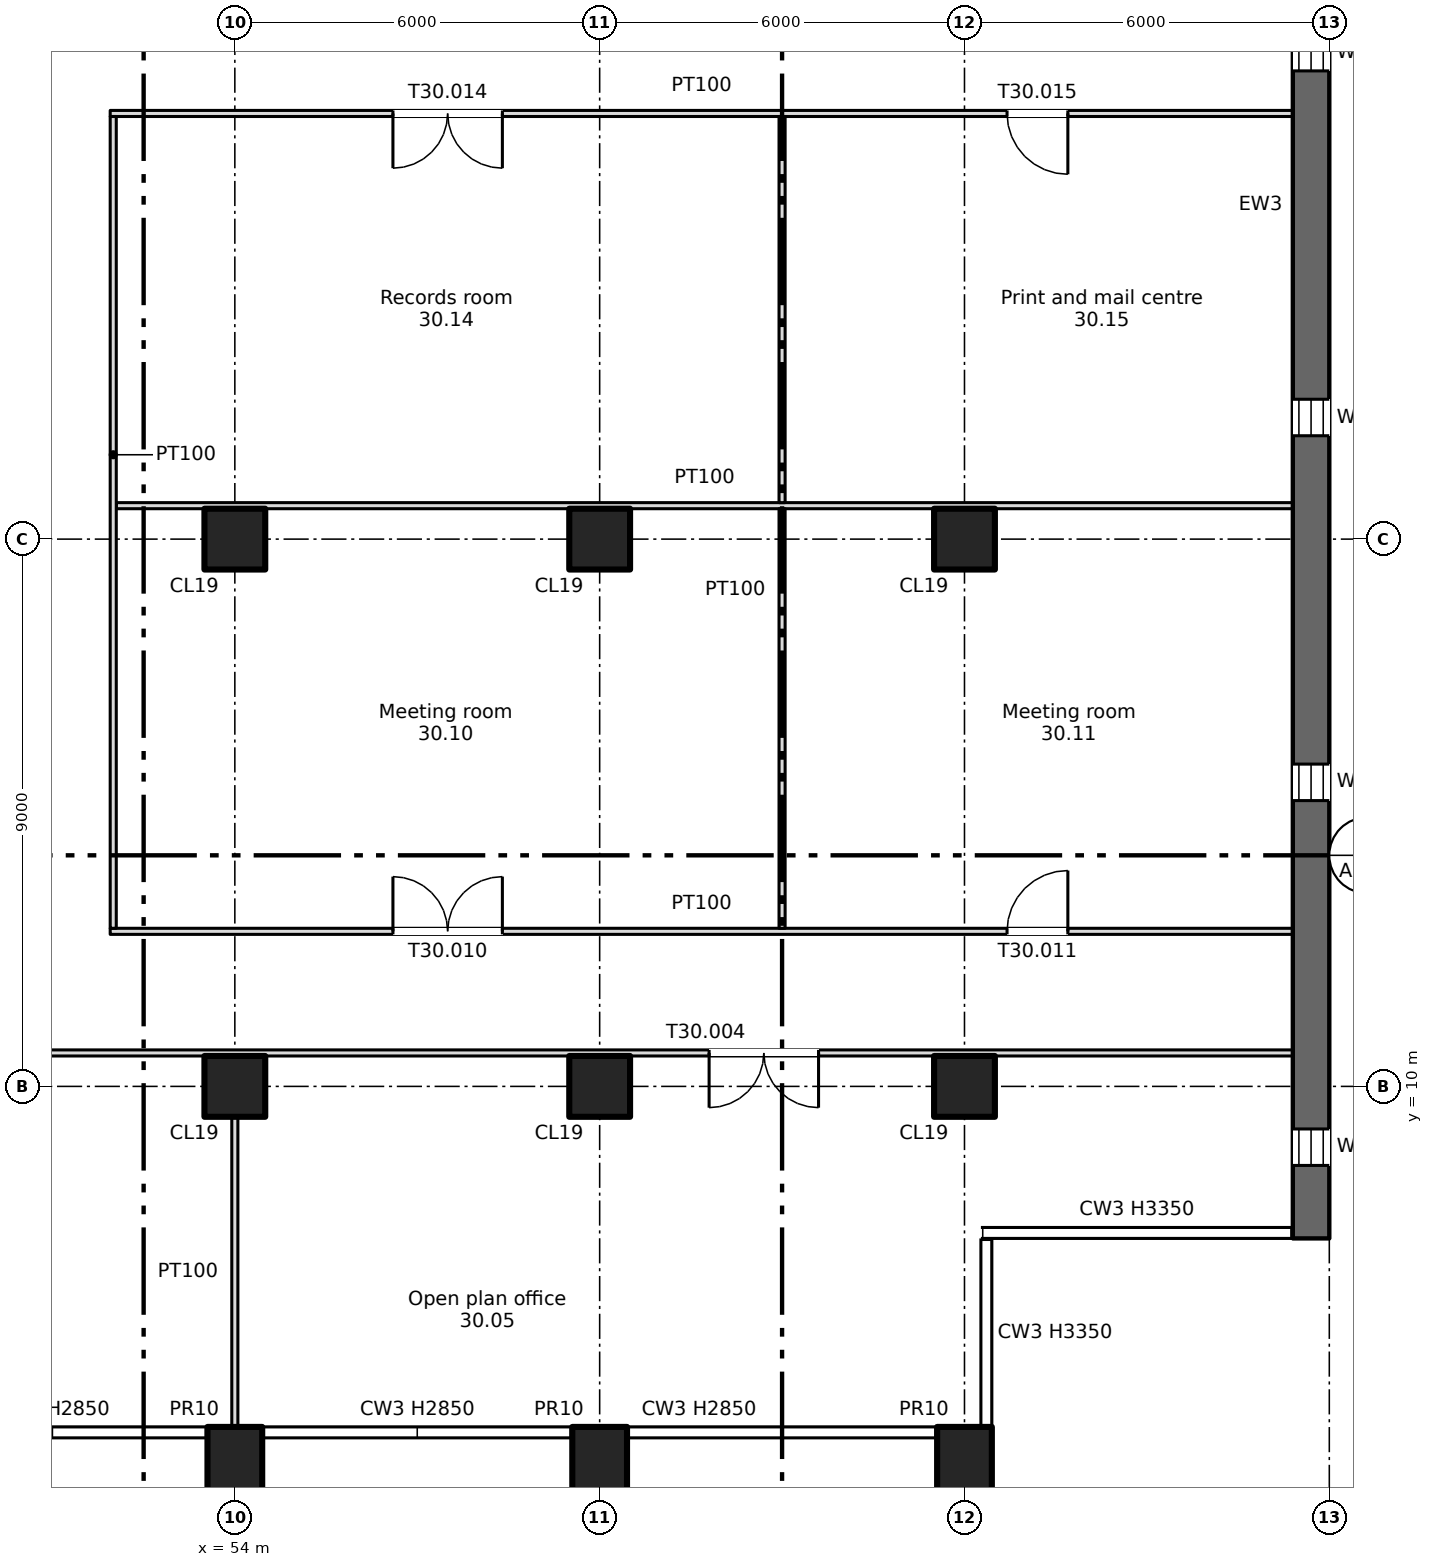
"""IFC4 building model, lengths in metres.
Left out: names, types, materials, properties, quantities, classifications, styles, units other than length and angle.
Written with IfcOpenShell. Run it as: python <this file> out.ifc"""

import sys

from ifc_helpers import new_model, si_unit, direction, frame, frame_2d, origin, origin_2d, place, context, subcontext, project, spatial, rectangle, extrude, element, fill, save


model = new_model("IFC4")
c1 = context("Model", 3, precision=1e-05, world=origin(), true_north=direction((0.0, 1.0)))
c2 = subcontext(c1, "Body", "Model", "MODEL_VIEW")
j1 = project(units=[si_unit("LENGTHUNIT", "METRE"), si_unit("PLANEANGLEUNIT", "RADIAN")], contexts=[c1])
p1 = place(None, origin())
s1 = spatial("IfcSite", under=j1, at=p1, CompositionType="ELEMENT")
p2 = place(p1, origin())
s2 = spatial("IfcBuilding", under=s1, at=p2, CompositionType="ELEMENT")
p3 = place(p2, frame((0.0, 0.0, 211.75)))
s3 = spatial("IfcBuildingStorey", under=s2, at=p3, CompositionType="ELEMENT", Elevation=211.75)
for number, where, z_axis, x_axis in (
    (1, (54.0, 3.7, -0.4), (0.0, 0.0, 1.0), (1.0, 0.0, 0.0)),
    (2, (60.0, 3.7, -0.4), (0.0, 0.0, 1.0), (1.0, 0.0, 0.0)),
    (3, (66.0, 3.7, -0.4), (0.0, 0.0, 1.0), (1.0, 0.0, 0.0)),
):
    element("IfcColumn", number, at=place(p3, frame(where, z_axis=z_axis, x_axis=x_axis)), inside=s3, PredefinedType="COLUMN", context=c2, shape_type="SweptSolid", body=[
        extrude(rectangle(XDim=0.9, YDim=1.4, at=origin_2d()), origin(), (0.0, 0.0, 1.0), 3.75),
    ])
for number, where, z_axis, x_axis in (
    (4, (54.0, 10.0, 0.0), (0.0, 0.0, 1.0), (1.0, 0.0, 0.0)),
    (5, (54.0, 19.0, 0.0), (0.0, 0.0, 1.0), (1.0, 0.0, 0.0)),
    (6, (60.0, 10.0, 0.0), (0.0, 0.0, 1.0), (1.0, 0.0, 0.0)),
    (7, (60.0, 19.0, 0.0), (0.0, 0.0, 1.0), (1.0, 0.0, 0.0)),
    (8, (66.0, 10.0, 0.0), (0.0, 0.0, 1.0), (1.0, 0.0, 0.0)),
    (9, (66.0, 19.0, 0.0), (0.0, 0.0, 1.0), (1.0, 0.0, 0.0)),
):
    element("IfcColumn", number, at=place(p3, frame(where, z_axis=z_axis, x_axis=x_axis)), inside=s3, PredefinedType="COLUMN", context=c2, shape_type="SweptSolid", body=[
        extrude(rectangle(XDim=1.0, YDim=1.0, at=origin_2d()), origin(), (0.0, 0.0, 1.0), 3.35),
    ])
p4 = place(p3, frame((71.7, 7.5, 0.0), z_axis=(0.0, 0.0, 1.0), x_axis=(0.0, 1.0, 0.0)))
e10 = element("IfcWall", 10, at=p4, inside=s3, PredefinedType="SHEAR", context=c2, shape_type="SweptSolid", body=[
    extrude(rectangle(XDim=34.0, YDim=0.6, at=frame_2d((17.0, 0.0))), origin(), (0.0, 0.0, 1.0), 3.35),
])
p5 = place(p4, frame((1.2, 0.0, 0.6)))
e11 = element("IfcOpeningElement", 11, at=p5, cuts=e10, PredefinedType="OPENING", context=c2, shape_type="SweptSolid", body=[
    extrude(rectangle(XDim=0.6, YDim=2.4, at=frame_2d((0.3, 1.2))), frame((0.0, 0.31, 0.0), z_axis=(0.0, -1.0, 0.0), x_axis=(1.0, 0.0, 0.0)), (0.0, 0.0, 1.0), 0.62),
])
p6 = place(p4, frame((7.2, 0.0, 0.6)))
e12 = element("IfcOpeningElement", 12, at=p6, cuts=e10, PredefinedType="OPENING", context=c2, shape_type="SweptSolid", body=[
    extrude(rectangle(XDim=0.6, YDim=2.4, at=frame_2d((0.3, 1.2))), frame((0.0, 0.31, 0.0), z_axis=(0.0, -1.0, 0.0), x_axis=(1.0, 0.0, 0.0)), (0.0, 0.0, 1.0), 0.62),
])
p7 = place(p4, frame((13.2, 0.0, 0.6)))
e13 = element("IfcOpeningElement", 13, at=p7, cuts=e10, PredefinedType="OPENING", context=c2, shape_type="SweptSolid", body=[
    extrude(rectangle(XDim=0.6, YDim=2.4, at=frame_2d((0.3, 1.2))), frame((0.0, 0.31, 0.0), z_axis=(0.0, -1.0, 0.0), x_axis=(1.0, 0.0, 0.0)), (0.0, 0.0, 1.0), 0.62),
])
p8 = place(p4, frame((19.2, 0.0, 0.6)))
e14 = element("IfcOpeningElement", 14, at=p8, cuts=e10, PredefinedType="OPENING", context=c2, shape_type="SweptSolid", body=[
    extrude(rectangle(XDim=0.6, YDim=2.4, at=frame_2d((0.3, 1.2))), frame((0.0, 0.31, 0.0), z_axis=(0.0, -1.0, 0.0), x_axis=(1.0, 0.0, 0.0)), (0.0, 0.0, 1.0), 0.62),
])
p9 = place(p4, frame((25.2, 0.0, 0.6)))
e15 = element("IfcOpeningElement", 15, at=p9, cuts=e10, PredefinedType="OPENING", context=c2, shape_type="SweptSolid", body=[
    extrude(rectangle(XDim=0.6, YDim=2.4, at=frame_2d((0.3, 1.2))), frame((0.0, 0.31, 0.0), z_axis=(0.0, -1.0, 0.0), x_axis=(1.0, 0.0, 0.0)), (0.0, 0.0, 1.0), 0.62),
])
p10 = place(p4, frame((31.2, 0.0, 0.6)))
e16 = element("IfcOpeningElement", 16, at=p10, cuts=e10, PredefinedType="OPENING", context=c2, shape_type="SweptSolid", body=[
    extrude(rectangle(XDim=0.6, YDim=2.4, at=frame_2d((0.3, 1.2))), frame((0.0, 0.31, 0.0), z_axis=(0.0, -1.0, 0.0), x_axis=(1.0, 0.0, 0.0)), (0.0, 0.0, 1.0), 0.62),
])
p11 = place(p3, frame((6.6, 10.55, 0.0), z_axis=(0.0, 0.0, 1.0), x_axis=(1.0, 0.0, 0.0)))
e17 = element("IfcWall", 17, at=p11, inside=s3, PredefinedType="PARTITIONING", context=c2, shape_type="SweptSolid", body=[
    extrude(rectangle(XDim=64.8, YDim=0.1, at=frame_2d((32.4, 0.0))), origin(), (0.0, 0.0, 1.0), 3.35),
])
p12 = place(p11, frame((30.0, 0.0, 0.0)))
e18 = element("IfcOpeningElement", 18, at=p12, cuts=e17, PredefinedType="OPENING", context=c2, shape_type="SweptSolid", body=[
    extrude(rectangle(XDim=1.8, YDim=2.1, at=frame_2d((0.9, 1.05))), frame((0.0, 0.06, 0.0), z_axis=(0.0, -1.0, 0.0), x_axis=(1.0, 0.0, 0.0)), (0.0, 0.0, 1.0), 0.12),
])
p13 = place(p11, frame((42.0, 0.0, 0.0)))
e19 = element("IfcOpeningElement", 19, at=p13, cuts=e17, PredefinedType="OPENING", context=c2, shape_type="SweptSolid", body=[
    extrude(rectangle(XDim=1.8, YDim=2.1, at=frame_2d((0.9, 1.05))), frame((0.0, 0.06, 0.0), z_axis=(0.0, -1.0, 0.0), x_axis=(1.0, 0.0, 0.0)), (0.0, 0.0, 1.0), 0.12),
])
p14 = place(p11, frame((12.05, 0.0, 0.0)))
e20 = element("IfcOpeningElement", 20, at=p14, cuts=e17, PredefinedType="OPENING", context=c2, shape_type="SweptSolid", body=[
    extrude(rectangle(XDim=1.8, YDim=2.1, at=frame_2d((0.9, 1.05))), frame((0.0, 0.06, 0.0), z_axis=(0.0, -1.0, 0.0), x_axis=(1.0, 0.0, 0.0)), (0.0, 0.0, 1.0), 0.12),
])
p15 = place(p11, frame((55.2, 0.0, 0.0)))
e21 = element("IfcOpeningElement", 21, at=p15, cuts=e17, PredefinedType="OPENING", context=c2, shape_type="SweptSolid", body=[
    extrude(rectangle(XDim=1.8, YDim=2.1, at=frame_2d((0.9, 1.05))), frame((0.0, 0.06, 0.0), z_axis=(0.0, -1.0, 0.0), x_axis=(1.0, 0.0, 0.0)), (0.0, 0.0, 1.0), 0.12),
])
p16 = place(p3, frame((51.95, 12.55, 0.0), z_axis=(0.0, 0.0, 1.0), x_axis=(1.0, 0.0, 0.0)))
e22 = element("IfcWall", 22, at=p16, inside=s3, PredefinedType="PARTITIONING", context=c2, shape_type="SweptSolid", body=[
    extrude(rectangle(XDim=19.45, YDim=0.1, at=frame_2d((9.725, 0.0))), origin(), (0.0, 0.0, 1.0), 3.35),
])
p17 = place(p16, frame((4.65, 0.0, 0.0)))
e23 = element("IfcOpeningElement", 23, at=p17, cuts=e22, PredefinedType="OPENING", context=c2, shape_type="SweptSolid", body=[
    extrude(rectangle(XDim=1.8, YDim=2.1, at=frame_2d((0.9, 1.05))), frame((0.0, 0.06, 0.0), z_axis=(0.0, -1.0, 0.0), x_axis=(1.0, 0.0, 0.0)), (0.0, 0.0, 1.0), 0.12),
])
p18 = place(p16, frame((14.75, 0.0, 0.0)))
e24 = element("IfcOpeningElement", 24, at=p18, cuts=e22, PredefinedType="OPENING", context=c2, shape_type="SweptSolid", body=[
    extrude(rectangle(XDim=1.0, YDim=2.1, at=frame_2d((0.5, 1.05))), frame((0.0, 0.06, 0.0), z_axis=(0.0, -1.0, 0.0), x_axis=(1.0, 0.0, 0.0)), (0.0, 0.0, 1.0), 0.12),
])
p19 = place(p3, frame((52.05, 19.55, 0.0), z_axis=(0.0, 0.0, 1.0), x_axis=(1.0, 0.0, 0.0)))
e25 = element("IfcWall", 25, at=p19, inside=s3, PredefinedType="PARTITIONING", context=c2, shape_type="SweptSolid", body=[
    extrude(rectangle(XDim=19.35, YDim=0.1, at=frame_2d((9.675, 0.0))), origin(), (0.0, 0.0, 1.0), 3.35),
])
p20 = place(p3, frame((51.95, 26.0, 0.0), z_axis=(0.0, 0.0, 1.0), x_axis=(1.0, 0.0, 0.0)))
e26 = element("IfcWall", 26, at=p20, inside=s3, PredefinedType="PARTITIONING", context=c2, shape_type="SweptSolid", body=[
    extrude(rectangle(XDim=19.45, YDim=0.1, at=frame_2d((9.725, 0.0))), origin(), (0.0, 0.0, 1.0), 3.35),
])
p21 = place(p20, frame((4.65, 0.0, 0.0)))
e27 = element("IfcOpeningElement", 27, at=p21, cuts=e26, PredefinedType="OPENING", context=c2, shape_type="SweptSolid", body=[
    extrude(rectangle(XDim=1.8, YDim=2.1, at=frame_2d((0.9, 1.05))), frame((0.0, 0.06, 0.0), z_axis=(0.0, -1.0, 0.0), x_axis=(1.0, 0.0, 0.0)), (0.0, 0.0, 1.0), 0.12),
])
p22 = place(p20, frame((14.75, 0.0, 0.0)))
e28 = element("IfcOpeningElement", 28, at=p22, cuts=e26, PredefinedType="OPENING", context=c2, shape_type="SweptSolid", body=[
    extrude(rectangle(XDim=1.0, YDim=2.1, at=frame_2d((0.5, 1.05))), frame((0.0, 0.06, 0.0), z_axis=(0.0, -1.0, 0.0), x_axis=(1.0, 0.0, 0.0)), (0.0, 0.0, 1.0), 0.12),
])
p23 = place(p3, frame((52.0, 12.6, 0.0), z_axis=(0.0, 0.0, 1.0), x_axis=(0.0, 1.0, 0.0)))
e29 = element("IfcWall", 29, at=p23, inside=s3, PredefinedType="PARTITIONING", context=c2, shape_type="SweptSolid", body=[
    extrude(rectangle(XDim=13.35, YDim=0.1, at=frame_2d((6.675, 0.0))), origin(), (0.0, 0.0, 1.0), 3.35),
])
p24 = place(p3, frame((54.0, 4.4, 0.0), z_axis=(0.0, 0.0, 1.0), x_axis=(0.0, 1.0, 0.0)))
e30 = element("IfcWall", 30, at=p24, inside=s3, PredefinedType="PARTITIONING", context=c2, shape_type="SweptSolid", body=[
    extrude(rectangle(XDim=5.1, YDim=0.1, at=frame_2d((2.55, 0.0))), origin(), (0.0, 0.0, 1.0), 3.35),
])
p25 = place(p3, frame((63.0, 12.6, 0.0), z_axis=(0.0, 0.0, 1.0), x_axis=(0.0, 1.0, 0.0)))
e31 = element("IfcWall", 31, at=p25, inside=s3, PredefinedType="PARTITIONING", context=c2, shape_type="SweptSolid", body=[
    extrude(rectangle(XDim=6.9, YDim=0.1, at=frame_2d((3.45, 0.0))), origin(), (0.0, 0.0, 1.0), 3.35),
])
p26 = place(p3, frame((63.0, 19.6, 0.0), z_axis=(0.0, 0.0, 1.0), x_axis=(0.0, 1.0, 0.0)))
e32 = element("IfcWall", 32, at=p26, inside=s3, PredefinedType="PARTITIONING", context=c2, shape_type="SweptSolid", body=[
    extrude(rectangle(XDim=6.35, YDim=0.1, at=frame_2d((3.175, 0.0))), origin(), (0.0, 0.0, 1.0), 3.35),
])
p27 = place(p5, origin())
e33 = element("IfcWindow", 33, at=p27, inside=s3, PartitioningType="SINGLE_PANEL", PredefinedType="WINDOW", context=c2, shape_type="SweptSolid", body=[
    extrude(rectangle(XDim=0.6, YDim=2.4, at=frame_2d((0.3, 1.2))), frame((0.0, 0.03, 0.0), z_axis=(0.0, -1.0, 0.0), x_axis=(1.0, 0.0, 0.0)), (0.0, 0.0, 1.0), 0.06),
])
fill(e11, e33)
p28 = place(p6, origin())
e34 = element("IfcWindow", 34, at=p28, inside=s3, PartitioningType="SINGLE_PANEL", PredefinedType="WINDOW", context=c2, shape_type="SweptSolid", body=[
    extrude(rectangle(XDim=0.6, YDim=2.4, at=frame_2d((0.3, 1.2))), frame((0.0, 0.03, 0.0), z_axis=(0.0, -1.0, 0.0), x_axis=(1.0, 0.0, 0.0)), (0.0, 0.0, 1.0), 0.06),
])
fill(e12, e34)
p29 = place(p7, origin())
e35 = element("IfcWindow", 35, at=p29, inside=s3, PartitioningType="SINGLE_PANEL", PredefinedType="WINDOW", context=c2, shape_type="SweptSolid", body=[
    extrude(rectangle(XDim=0.6, YDim=2.4, at=frame_2d((0.3, 1.2))), frame((0.0, 0.03, 0.0), z_axis=(0.0, -1.0, 0.0), x_axis=(1.0, 0.0, 0.0)), (0.0, 0.0, 1.0), 0.06),
])
fill(e13, e35)
p30 = place(p8, origin())
e36 = element("IfcWindow", 36, at=p30, inside=s3, PartitioningType="SINGLE_PANEL", PredefinedType="WINDOW", context=c2, shape_type="SweptSolid", body=[
    extrude(rectangle(XDim=0.6, YDim=2.4, at=frame_2d((0.3, 1.2))), frame((0.0, 0.03, 0.0), z_axis=(0.0, -1.0, 0.0), x_axis=(1.0, 0.0, 0.0)), (0.0, 0.0, 1.0), 0.06),
])
fill(e14, e36)
p31 = place(p15, origin())
e37 = element("IfcDoor", 37, at=p31, inside=s3, OperationType="DOUBLE_DOOR_SINGLE_SWING", PredefinedType="DOOR", context=c2, shape_type="SweptSolid", body=[
    extrude(rectangle(XDim=1.8, YDim=2.1, at=frame_2d((0.9, 1.05))), frame((0.0, 0.025, 0.0), z_axis=(0.0, -1.0, 0.0), x_axis=(1.0, 0.0, 0.0)), (0.0, 0.0, 1.0), 0.05),
])
fill(e21, e37)
p32 = place(p17, origin())
e38 = element("IfcDoor", 38, at=p32, inside=s3, OperationType="DOUBLE_DOOR_SINGLE_SWING", PredefinedType="DOOR", context=c2, shape_type="SweptSolid", body=[
    extrude(rectangle(XDim=1.8, YDim=2.1, at=frame_2d((0.9, 1.05))), frame((0.0, 0.025, 0.0), z_axis=(0.0, -1.0, 0.0), x_axis=(1.0, 0.0, 0.0)), (0.0, 0.0, 1.0), 0.05),
])
fill(e23, e38)
p33 = place(p18, origin())
e39 = element("IfcDoor", 39, at=p33, inside=s3, OperationType="SINGLE_SWING_RIGHT", PredefinedType="DOOR", context=c2, shape_type="SweptSolid", body=[
    extrude(rectangle(XDim=1.0, YDim=2.1, at=frame_2d((0.5, 1.05))), frame((0.0, 0.025, 0.0), z_axis=(0.0, -1.0, 0.0), x_axis=(1.0, 0.0, 0.0)), (0.0, 0.0, 1.0), 0.05),
])
fill(e24, e39)
p34 = place(p21, origin())
e40 = element("IfcDoor", 40, at=p34, inside=s3, OperationType="DOUBLE_DOOR_SINGLE_SWING", PredefinedType="DOOR", context=c2, shape_type="SweptSolid", body=[
    extrude(rectangle(XDim=1.8, YDim=2.1, at=frame_2d((0.9, 1.05))), frame((0.0, 0.025, 0.0), z_axis=(0.0, -1.0, 0.0), x_axis=(1.0, 0.0, 0.0)), (0.0, 0.0, 1.0), 0.05),
])
fill(e27, e40)
p35 = place(p22, origin())
e41 = element("IfcDoor", 41, at=p35, inside=s3, OperationType="SINGLE_SWING_RIGHT", PredefinedType="DOOR", context=c2, shape_type="SweptSolid", body=[
    extrude(rectangle(XDim=1.0, YDim=2.1, at=frame_2d((0.5, 1.05))), frame((0.0, 0.025, 0.0), z_axis=(0.0, -1.0, 0.0), x_axis=(1.0, 0.0, 0.0)), (0.0, 0.0, 1.0), 0.05),
])
fill(e28, e41)
save(model, sys.argv[1])
